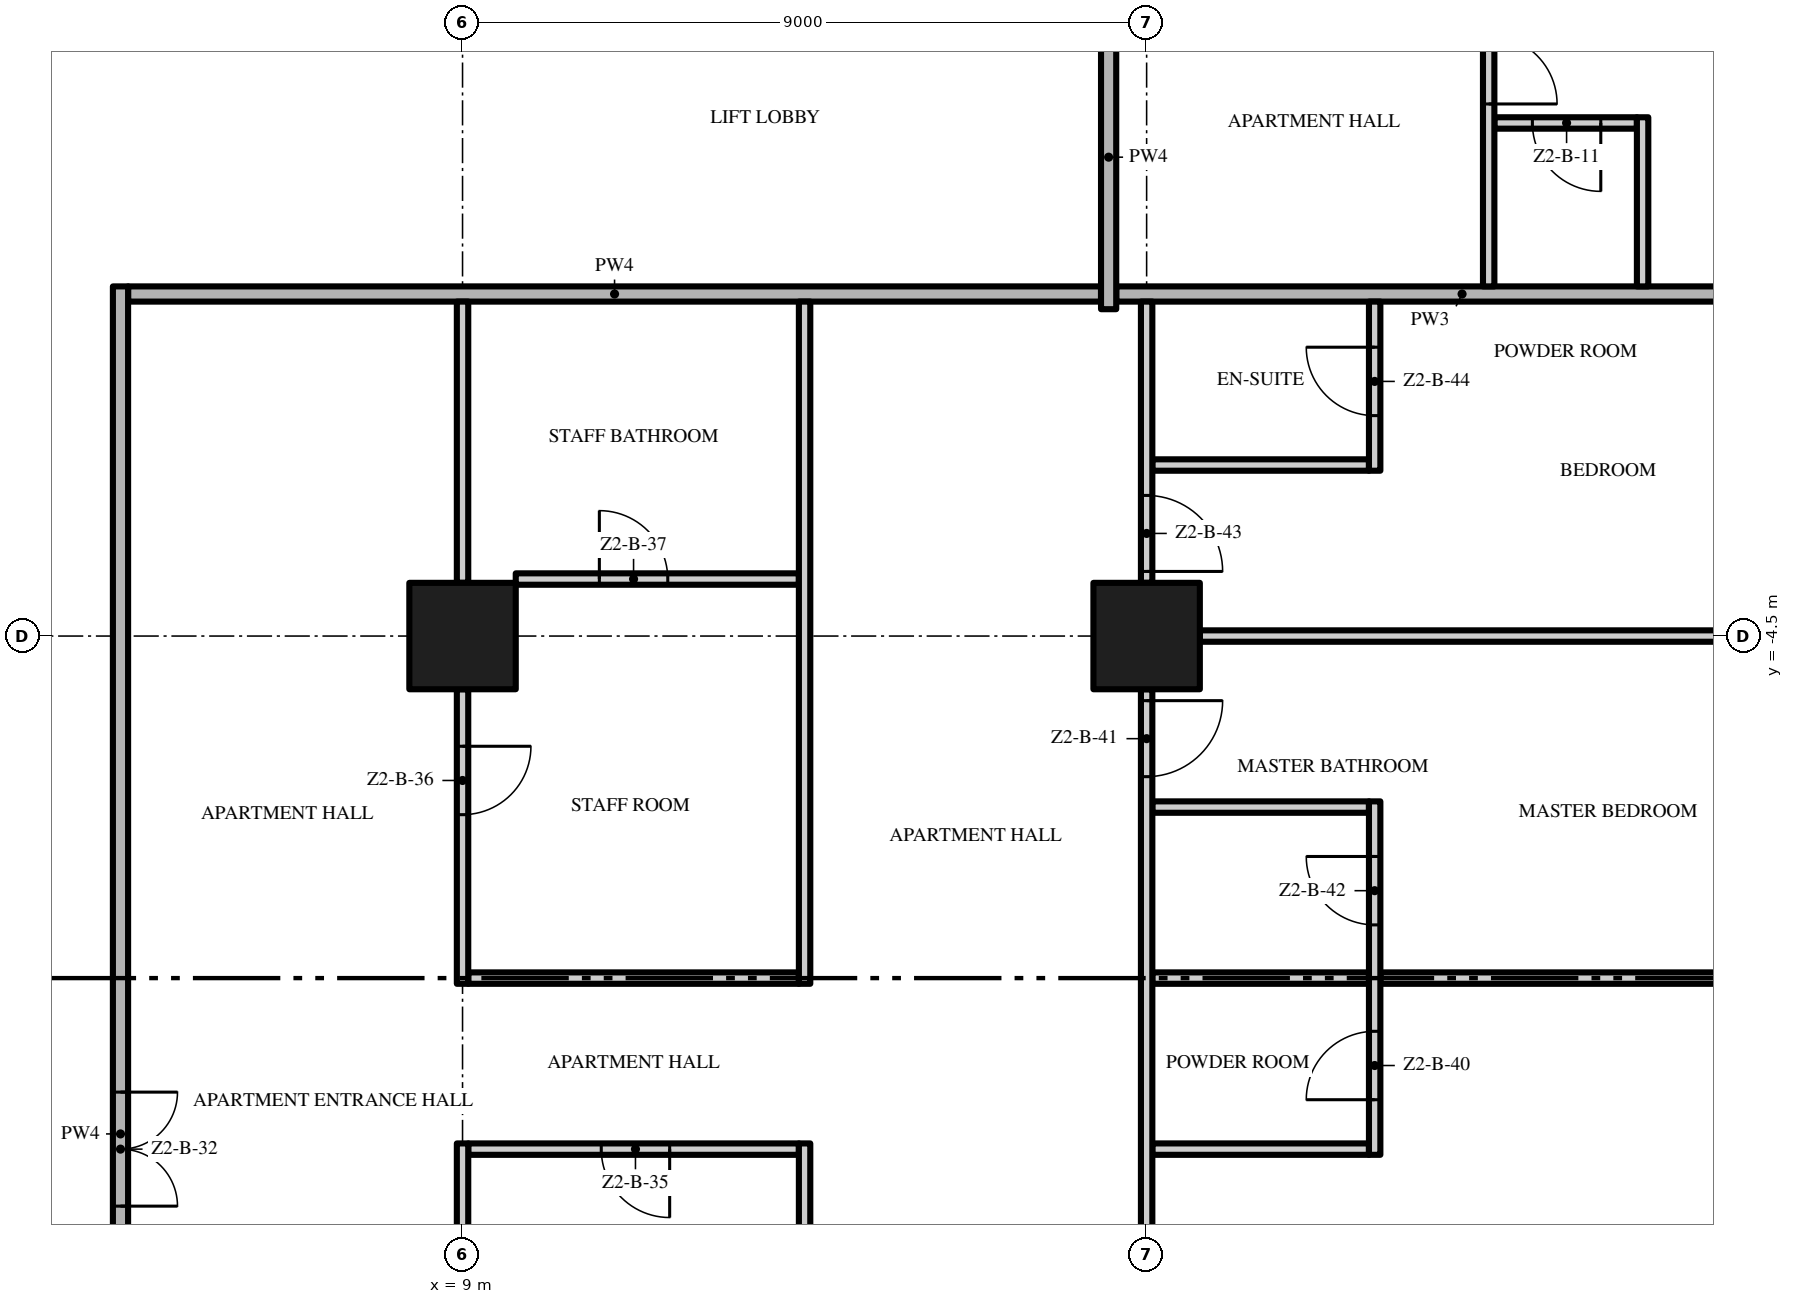
"""IFC4 building model, lengths in metres.
Left out: names, types, materials, properties, quantities, classifications, styles, units other than length and angle.
Written with IfcOpenShell. Run it as: python <this file> out.ifc"""

import sys

from ifc_helpers import new_model, si_unit, direction, frame, frame_2d, origin, origin_2d, place, context, subcontext, project, spatial, rectangle, extrude, element, fill, save


model = new_model("IFC4")
c1 = context("Model", 3, precision=1e-05, world=origin(), true_north=direction((0.0, 1.0)))
c2 = subcontext(c1, "Body", "Model", "MODEL_VIEW")
j1 = project(units=[si_unit("LENGTHUNIT", "METRE"), si_unit("PLANEANGLEUNIT", "RADIAN")], contexts=[c1])
p1 = place(None, origin())
s1 = spatial("IfcSite", under=j1, at=p1, CompositionType="ELEMENT")
p2 = place(p1, origin())
s2 = spatial("IfcBuilding", under=s1, at=p2, CompositionType="ELEMENT")
p3 = place(p2, frame((0.0, 0.0, 80.8)))
s3 = spatial("IfcBuildingStorey", under=s2, at=p3, CompositionType="ELEMENT", Elevation=80.8)
for number, where, z_axis, x_axis in (
    (1, (18.0, -4.5, 0.0), (0.0, 0.0, 1.0), (1.0, 0.0, 0.0)),
    (2, (9.0, -4.5, 0.0), (0.0, 0.0, 1.0), (1.0, 0.0, 0.0)),
):
    element("IfcColumn", number, at=place(p3, frame(where, z_axis=z_axis, x_axis=x_axis)), inside=s3, PredefinedType="COLUMN", context=c2, shape_type="SweptSolid", body=[
        extrude(rectangle(XDim=1.4, YDim=1.4, at=origin_2d()), origin(), (0.0, 0.0, 1.0), 3.5),
    ])
p4 = place(p3, frame((13.425, -11.25, 0.0), z_axis=(0.0, 0.0, 1.0), x_axis=(-1.0, 0.0, 0.0)))
e3 = element("IfcWall", 3, at=p4, inside=s3, PredefinedType="PARTITIONING", context=c2, shape_type="SweptSolid", body=[
    extrude(rectangle(XDim=4.35, YDim=0.15, at=frame_2d((2.175, 0.0))), origin(), (0.0, 0.0, 1.0), 3.5),
])
p5 = place(p4, frame((1.7, 0.0, 0.0)))
e4 = element("IfcOpeningElement", 4, at=p5, cuts=e3, PredefinedType="OPENING", context=c2, shape_type="SweptSolid", body=[
    extrude(rectangle(XDim=0.9, YDim=2.1, at=frame_2d((0.45, 1.05))), frame((0.0, 0.085, 0.0), z_axis=(0.0, -1.0, 0.0), x_axis=(1.0, 0.0, 0.0)), (0.0, 0.0, 1.0), 0.17),
])
p6 = place(p3, frame((18.075, -11.25, 0.0), z_axis=(0.0, 0.0, 1.0), x_axis=(1.0, 0.0, 0.0)))
e5 = element("IfcWall", 5, at=p6, inside=s3, PredefinedType="PARTITIONING", context=c2, shape_type="SweptSolid", body=[
    extrude(rectangle(XDim=2.85, YDim=0.15, at=frame_2d((1.425, 0.0))), origin(), (0.0, 0.0, 1.0), 3.5),
])
p7 = place(p3, frame((9.075, -9.0, 0.0), z_axis=(0.0, 0.0, 1.0), x_axis=(1.0, 0.0, 0.0)))
e6 = element("IfcWall", 6, at=p7, inside=s3, PredefinedType="PARTITIONING", context=c2, shape_type="SweptSolid", body=[
    extrude(rectangle(XDim=4.35, YDim=0.15, at=frame_2d((2.175, 0.0))), origin(), (0.0, 0.0, 1.0), 3.5),
])
p8 = place(p3, frame((18.075, -9.0, 0.0), z_axis=(0.0, 0.0, 1.0), x_axis=(1.0, 0.0, 0.0)))
e7 = element("IfcWall", 7, at=p8, inside=s3, PredefinedType="PARTITIONING", context=c2, shape_type="SweptSolid", body=[
    extrude(rectangle(XDim=2.85, YDim=0.15, at=frame_2d((1.425, 0.0))), origin(), (0.0, 0.0, 1.0), 3.5),
])
p9 = place(p3, frame((21.075, -9.0, 0.0), z_axis=(0.0, 0.0, 1.0), x_axis=(1.0, 0.0, 0.0)))
e8 = element("IfcWall", 8, at=p9, inside=s3, PredefinedType="PARTITIONING", context=c2, shape_type="SweptSolid", body=[
    extrude(rectangle(XDim=5.625, YDim=0.15, at=frame_2d((2.812, 0.0))), origin(), (0.0, 0.0, 1.0), 3.5),
])
p10 = place(p3, frame((18.075, -6.75, 0.0), z_axis=(0.0, 0.0, 1.0), x_axis=(1.0, 0.0, 0.0)))
e9 = element("IfcWall", 9, at=p10, inside=s3, PredefinedType="PARTITIONING", context=c2, shape_type="SweptSolid", body=[
    extrude(rectangle(XDim=2.85, YDim=0.15, at=frame_2d((1.425, 0.0))), origin(), (0.0, 0.0, 1.0), 3.5),
])
p11 = place(p3, frame((18.7, -4.5, 0.0), z_axis=(0.0, 0.0, 1.0), x_axis=(1.0, 0.0, 0.0)))
e10 = element("IfcWall", 10, at=p11, inside=s3, PredefinedType="PARTITIONING", context=c2, shape_type="SweptSolid", body=[
    extrude(rectangle(XDim=7.0, YDim=0.15, at=frame_2d((3.5, 0.0))), origin(), (0.0, 0.0, 1.0), 3.5),
])
p12 = place(p3, frame((9.7, -3.75, 0.0), z_axis=(0.0, 0.0, 1.0), x_axis=(1.0, 0.0, 0.0)))
e11 = element("IfcWall", 11, at=p12, inside=s3, PredefinedType="PARTITIONING", context=c2, shape_type="SweptSolid", body=[
    extrude(rectangle(XDim=3.725, YDim=0.15, at=frame_2d((1.863, 0.0))), origin(), (0.0, 0.0, 1.0), 3.5),
])
p13 = place(p12, frame((1.1, 0.0, 0.0)))
e12 = element("IfcOpeningElement", 12, at=p13, cuts=e11, PredefinedType="OPENING", context=c2, shape_type="SweptSolid", body=[
    extrude(rectangle(XDim=0.9, YDim=2.1, at=frame_2d((0.45, 1.05))), frame((0.0, 0.085, 0.0), z_axis=(0.0, -1.0, 0.0), x_axis=(1.0, 0.0, 0.0)), (0.0, 0.0, 1.0), 0.17),
])
p14 = place(p3, frame((18.075, -2.25, 0.0), z_axis=(0.0, 0.0, 1.0), x_axis=(1.0, 0.0, 0.0)))
e13 = element("IfcWall", 13, at=p14, inside=s3, PredefinedType="PARTITIONING", context=c2, shape_type="SweptSolid", body=[
    extrude(rectangle(XDim=2.85, YDim=0.15, at=frame_2d((1.425, 0.0))), origin(), (0.0, 0.0, 1.0), 3.5),
])
p15 = place(p3, frame((4.6, 0.0, 0.0), z_axis=(0.0, 0.0, 1.0), x_axis=(1.0, 0.0, 0.0)))
e14 = element("IfcWall", 14, at=p15, inside=s3, PredefinedType="PARTITIONING", context=c2, shape_type="SweptSolid", body=[
    extrude(rectangle(XDim=12.8, YDim=0.2, at=frame_2d((6.4, 0.0))), origin(), (0.0, 0.0, 1.0), 3.5),
])
p16 = place(p3, frame((17.6, 0.0, 0.0), z_axis=(0.0, 0.0, 1.0), x_axis=(1.0, 0.0, 0.0)))
e15 = element("IfcWall", 15, at=p16, inside=s3, PredefinedType="PARTITIONING", context=c2, shape_type="SweptSolid", body=[
    extrude(rectangle(XDim=9.1, YDim=0.2, at=frame_2d((4.55, 0.0))), origin(), (0.0, 0.0, 1.0), 3.5),
])
p17 = place(p3, frame((24.45, 2.25, 0.0), z_axis=(0.0, 0.0, 1.0), x_axis=(-1.0, 0.0, 0.0)))
e16 = element("IfcWall", 16, at=p17, inside=s3, PredefinedType="PARTITIONING", context=c2, shape_type="SweptSolid", body=[
    extrude(rectangle(XDim=1.875, YDim=0.15, at=frame_2d((0.938, 0.0))), origin(), (0.0, 0.0, 1.0), 3.5),
])
p18 = place(p17, frame((0.475, 0.0, 0.0)))
e17 = element("IfcOpeningElement", 17, at=p18, cuts=e16, PredefinedType="OPENING", context=c2, shape_type="SweptSolid", body=[
    extrude(rectangle(XDim=0.9, YDim=2.1, at=frame_2d((0.45, 1.05))), frame((0.0, 0.085, 0.0), z_axis=(0.0, -1.0, 0.0), x_axis=(1.0, 0.0, 0.0)), (0.0, 0.0, 1.0), 0.17),
])
p19 = place(p3, frame((4.5, 0.1, 0.0), z_axis=(0.0, 0.0, 1.0), x_axis=(0.0, -1.0, 0.0)))
e18 = element("IfcWall", 18, at=p19, inside=s3, PredefinedType="PARTITIONING", context=c2, shape_type="SweptSolid", body=[
    extrude(rectangle(XDim=22.3, YDim=0.2, at=frame_2d((11.15, 0.0))), origin(), (0.0, 0.0, 1.0), 3.5),
])
p20 = place(p19, frame((10.6, 0.0, 0.0)))
e19 = element("IfcOpeningElement", 19, at=p20, cuts=e18, PredefinedType="OPENING", context=c2, shape_type="SweptSolid", body=[
    extrude(rectangle(XDim=1.5, YDim=2.4, at=frame_2d((0.75, 1.2))), frame((0.0, 0.11, 0.0), z_axis=(0.0, -1.0, 0.0), x_axis=(1.0, 0.0, 0.0)), (0.0, 0.0, 1.0), 0.22),
])
p21 = place(p3, frame((9.0, -12.8, 0.0), z_axis=(0.0, 0.0, 1.0), x_axis=(0.0, 1.0, 0.0)))
e20 = element("IfcWall", 20, at=p21, inside=s3, PredefinedType="PARTITIONING", context=c2, shape_type="SweptSolid", body=[
    extrude(rectangle(XDim=1.625, YDim=0.15, at=frame_2d((0.812, 0.0))), origin(), (0.0, 0.0, 1.0), 3.5),
])
p22 = place(p3, frame((9.0, -5.2, 0.0), z_axis=(0.0, 0.0, 1.0), x_axis=(0.0, -1.0, 0.0)))
e21 = element("IfcWall", 21, at=p22, inside=s3, PredefinedType="PARTITIONING", context=c2, shape_type="SweptSolid", body=[
    extrude(rectangle(XDim=3.875, YDim=0.15, at=frame_2d((1.938, 0.0))), origin(), (0.0, 0.0, 1.0), 3.5),
])
p23 = place(p22, frame((0.75, 0.0, 0.0)))
e22 = element("IfcOpeningElement", 22, at=p23, cuts=e21, PredefinedType="OPENING", context=c2, shape_type="SweptSolid", body=[
    extrude(rectangle(XDim=0.9, YDim=2.1, at=frame_2d((0.45, 1.05))), frame((0.0, 0.085, 0.0), z_axis=(0.0, -1.0, 0.0), x_axis=(1.0, 0.0, 0.0)), (0.0, 0.0, 1.0), 0.17),
])
p24 = place(p3, frame((9.0, -3.8, 0.0), z_axis=(0.0, 0.0, 1.0), x_axis=(0.0, 1.0, 0.0)))
e23 = element("IfcWall", 23, at=p24, inside=s3, PredefinedType="PARTITIONING", context=c2, shape_type="SweptSolid", body=[
    extrude(rectangle(XDim=3.7, YDim=0.15, at=frame_2d((1.85, 0.0))), origin(), (0.0, 0.0, 1.0), 3.5),
])
p25 = place(p3, frame((13.5, -22.2, 0.0), z_axis=(0.0, 0.0, 1.0), x_axis=(0.0, 1.0, 0.0)))
e24 = element("IfcWall", 24, at=p25, inside=s3, PredefinedType="PARTITIONING", context=c2, shape_type="SweptSolid", body=[
    extrude(rectangle(XDim=11.025, YDim=0.15, at=frame_2d((5.513, 0.0))), origin(), (0.0, 0.0, 1.0), 3.5),
])
p26 = place(p3, frame((13.5, -9.075, 0.0), z_axis=(0.0, 0.0, 1.0), x_axis=(0.0, 1.0, 0.0)))
e25 = element("IfcWall", 25, at=p26, inside=s3, PredefinedType="PARTITIONING", context=c2, shape_type="SweptSolid", body=[
    extrude(rectangle(XDim=8.975, YDim=0.15, at=frame_2d((4.487, 0.0))), origin(), (0.0, 0.0, 1.0), 3.5),
])
p27 = place(p3, frame((17.5, -0.2, 0.0), z_axis=(0.0, 0.0, 1.0), x_axis=(0.0, 1.0, 0.0)))
e26 = element("IfcWall", 26, at=p27, inside=s3, PredefinedType="PARTITIONING", context=c2, shape_type="SweptSolid", body=[
    extrude(rectangle(XDim=4.0, YDim=0.2, at=frame_2d((2.0, 0.0))), origin(), (0.0, 0.0, 1.0), 3.5),
])
p28 = place(p3, frame((18.0, -5.2, 0.0), z_axis=(0.0, 0.0, 1.0), x_axis=(0.0, -1.0, 0.0)))
e27 = element("IfcWall", 27, at=p28, inside=s3, PredefinedType="PARTITIONING", context=c2, shape_type="SweptSolid", body=[
    extrude(rectangle(XDim=7.6, YDim=0.15, at=frame_2d((3.8, 0.0))), origin(), (0.0, 0.0, 1.0), 3.5),
])
p29 = place(p28, frame((0.15, 0.0, 0.0)))
e28 = element("IfcOpeningElement", 28, at=p29, cuts=e27, PredefinedType="OPENING", context=c2, shape_type="SweptSolid", body=[
    extrude(rectangle(XDim=1.0, YDim=2.4, at=frame_2d((0.5, 1.2))), frame((0.0, 0.085, 0.0), z_axis=(0.0, -1.0, 0.0), x_axis=(1.0, 0.0, 0.0)), (0.0, 0.0, 1.0), 0.17),
])
p30 = place(p3, frame((18.0, -0.1, 0.0), z_axis=(0.0, 0.0, 1.0), x_axis=(0.0, -1.0, 0.0)))
e29 = element("IfcWall", 29, at=p30, inside=s3, PredefinedType="PARTITIONING", context=c2, shape_type="SweptSolid", body=[
    extrude(rectangle(XDim=3.7, YDim=0.15, at=frame_2d((1.85, 0.0))), origin(), (0.0, 0.0, 1.0), 3.5),
])
p31 = place(p30, frame((2.55, 0.0, 0.0)))
e30 = element("IfcOpeningElement", 30, at=p31, cuts=e29, PredefinedType="OPENING", context=c2, shape_type="SweptSolid", body=[
    extrude(rectangle(XDim=1.0, YDim=2.4, at=frame_2d((0.5, 1.2))), frame((0.0, 0.085, 0.0), z_axis=(0.0, -1.0, 0.0), x_axis=(1.0, 0.0, 0.0)), (0.0, 0.0, 1.0), 0.17),
])
p32 = place(p3, frame((21.0, -11.325, 0.0), z_axis=(0.0, 0.0, 1.0), x_axis=(0.0, 1.0, 0.0)))
e31 = element("IfcWall", 31, at=p32, inside=s3, PredefinedType="PARTITIONING", context=c2, shape_type="SweptSolid", body=[
    extrude(rectangle(XDim=4.65, YDim=0.15, at=frame_2d((2.325, 0.0))), origin(), (0.0, 0.0, 1.0), 3.5),
])
p33 = place(p32, frame((0.725, 0.0, 0.0)))
e32 = element("IfcOpeningElement", 32, at=p33, cuts=e31, PredefinedType="OPENING", context=c2, shape_type="SweptSolid", body=[
    extrude(rectangle(XDim=0.9, YDim=2.1, at=frame_2d((0.45, 1.05))), frame((0.0, 0.085, 0.0), z_axis=(0.0, -1.0, 0.0), x_axis=(1.0, 0.0, 0.0)), (0.0, 0.0, 1.0), 0.17),
])
p34 = place(p32, frame((3.025, 0.0, 0.0)))
e33 = element("IfcOpeningElement", 33, at=p34, cuts=e31, PredefinedType="OPENING", context=c2, shape_type="SweptSolid", body=[
    extrude(rectangle(XDim=0.9, YDim=2.1, at=frame_2d((0.45, 1.05))), frame((0.0, 0.085, 0.0), z_axis=(0.0, -1.0, 0.0), x_axis=(1.0, 0.0, 0.0)), (0.0, 0.0, 1.0), 0.17),
])
p35 = place(p3, frame((21.0, -2.325, 0.0), z_axis=(0.0, 0.0, 1.0), x_axis=(0.0, 1.0, 0.0)))
e34 = element("IfcWall", 34, at=p35, inside=s3, PredefinedType="PARTITIONING", context=c2, shape_type="SweptSolid", body=[
    extrude(rectangle(XDim=2.225, YDim=0.15, at=frame_2d((1.113, 0.0))), origin(), (0.0, 0.0, 1.0), 3.5),
])
p36 = place(p35, frame((0.725, 0.0, 0.0)))
e35 = element("IfcOpeningElement", 35, at=p36, cuts=e34, PredefinedType="OPENING", context=c2, shape_type="SweptSolid", body=[
    extrude(rectangle(XDim=0.9, YDim=2.1, at=frame_2d((0.45, 1.05))), frame((0.0, 0.085, 0.0), z_axis=(0.0, -1.0, 0.0), x_axis=(1.0, 0.0, 0.0)), (0.0, 0.0, 1.0), 0.17),
])
p37 = place(p3, frame((22.5, 17.35, 0.0), z_axis=(0.0, 0.0, 1.0), x_axis=(0.0, -1.0, 0.0)))
e36 = element("IfcWall", 36, at=p37, inside=s3, PredefinedType="PARTITIONING", context=c2, shape_type="SweptSolid", body=[
    extrude(rectangle(XDim=17.25, YDim=0.15, at=frame_2d((8.625, 0.0))), origin(), (0.0, 0.0, 1.0), 3.5),
])
p38 = place(p37, frame((13.05, 0.0, 0.0)))
e37 = element("IfcOpeningElement", 37, at=p38, cuts=e36, PredefinedType="OPENING", context=c2, shape_type="SweptSolid", body=[
    extrude(rectangle(XDim=1.8, YDim=2.4, at=frame_2d((0.9, 1.2))), frame((0.0, 0.085, 0.0), z_axis=(0.0, -1.0, 0.0), x_axis=(1.0, 0.0, 0.0)), (0.0, 0.0, 1.0), 0.17),
])
p39 = place(p37, frame((5.6, 0.0, 0.0)))
e38 = element("IfcOpeningElement", 38, at=p39, cuts=e36, PredefinedType="OPENING", context=c2, shape_type="SweptSolid", body=[
    extrude(rectangle(XDim=1.0, YDim=2.4, at=frame_2d((0.5, 1.2))), frame((0.0, 0.085, 0.0), z_axis=(0.0, -1.0, 0.0), x_axis=(1.0, 0.0, 0.0)), (0.0, 0.0, 1.0), 0.17),
])
p40 = place(p3, frame((24.525, 0.1, 0.0), z_axis=(0.0, 0.0, 1.0), x_axis=(0.0, 1.0, 0.0)))
e39 = element("IfcWall", 39, at=p40, inside=s3, PredefinedType="PARTITIONING", context=c2, shape_type="SweptSolid", body=[
    extrude(rectangle(XDim=2.225, YDim=0.15, at=frame_2d((1.113, 0.0))), origin(), (0.0, 0.0, 1.0), 3.5),
])
p41 = place(p38, origin())
e40 = element("IfcDoor", 40, at=p41, inside=s3, OperationType="DOUBLE_DOOR_SINGLE_SWING", PredefinedType="DOOR", context=c2, shape_type="SweptSolid", body=[
    extrude(rectangle(XDim=1.8, YDim=2.4, at=frame_2d((0.9, 1.2))), frame((0.0, 0.025, 0.0), z_axis=(0.0, -1.0, 0.0), x_axis=(1.0, 0.0, 0.0)), (0.0, 0.0, 1.0), 0.05),
])
fill(e37, e40)
p42 = place(p18, origin())
e41 = element("IfcDoor", 41, at=p42, inside=s3, OperationType="SINGLE_SWING_LEFT", PredefinedType="DOOR", context=c2, shape_type="SweptSolid", body=[
    extrude(rectangle(XDim=0.9, YDim=2.1, at=frame_2d((0.45, 1.05))), frame((0.0, 0.025, 0.0), z_axis=(0.0, -1.0, 0.0), x_axis=(1.0, 0.0, 0.0)), (0.0, 0.0, 1.0), 0.05),
])
fill(e17, e41)
p43 = place(p20, origin())
e42 = element("IfcDoor", 42, at=p43, inside=s3, OperationType="DOUBLE_DOOR_SINGLE_SWING", PredefinedType="DOOR", context=c2, shape_type="SweptSolid", body=[
    extrude(rectangle(XDim=1.5, YDim=2.4, at=frame_2d((0.75, 1.2))), frame((0.0, 0.025, 0.0), z_axis=(0.0, -1.0, 0.0), x_axis=(1.0, 0.0, 0.0)), (0.0, 0.0, 1.0), 0.05),
])
fill(e19, e42)
p44 = place(p5, origin())
e43 = element("IfcDoor", 43, at=p44, inside=s3, OperationType="SINGLE_SWING_LEFT", PredefinedType="DOOR", context=c2, shape_type="SweptSolid", body=[
    extrude(rectangle(XDim=0.9, YDim=2.1, at=frame_2d((0.45, 1.05))), frame((0.0, 0.025, 0.0), z_axis=(0.0, -1.0, 0.0), x_axis=(1.0, 0.0, 0.0)), (0.0, 0.0, 1.0), 0.05),
])
fill(e4, e43)
p45 = place(p23, origin())
e44 = element("IfcDoor", 44, at=p45, inside=s3, OperationType="SINGLE_SWING_LEFT", PredefinedType="DOOR", context=c2, shape_type="SweptSolid", body=[
    extrude(rectangle(XDim=0.9, YDim=2.1, at=frame_2d((0.45, 1.05))), frame((0.0, 0.025, 0.0), z_axis=(0.0, -1.0, 0.0), x_axis=(1.0, 0.0, 0.0)), (0.0, 0.0, 1.0), 0.05),
])
fill(e22, e44)
p46 = place(p13, origin())
e45 = element("IfcDoor", 45, at=p46, inside=s3, OperationType="SINGLE_SWING_LEFT", PredefinedType="DOOR", context=c2, shape_type="SweptSolid", body=[
    extrude(rectangle(XDim=0.9, YDim=2.1, at=frame_2d((0.45, 1.05))), frame((0.0, 0.025, 0.0), z_axis=(0.0, -1.0, 0.0), x_axis=(1.0, 0.0, 0.0)), (0.0, 0.0, 1.0), 0.05),
])
fill(e12, e45)
p47 = place(p33, origin())
e46 = element("IfcDoor", 46, at=p47, inside=s3, OperationType="SINGLE_SWING_LEFT", PredefinedType="DOOR", context=c2, shape_type="SweptSolid", body=[
    extrude(rectangle(XDim=0.9, YDim=2.1, at=frame_2d((0.45, 1.05))), frame((0.0, 0.025, 0.0), z_axis=(0.0, -1.0, 0.0), x_axis=(1.0, 0.0, 0.0)), (0.0, 0.0, 1.0), 0.05),
])
fill(e32, e46)
p48 = place(p29, origin())
e47 = element("IfcDoor", 47, at=p48, inside=s3, OperationType="SINGLE_SWING_LEFT", PredefinedType="DOOR", context=c2, shape_type="SweptSolid", body=[
    extrude(rectangle(XDim=1.0, YDim=2.4, at=frame_2d((0.5, 1.2))), frame((0.0, 0.025, 0.0), z_axis=(0.0, -1.0, 0.0), x_axis=(1.0, 0.0, 0.0)), (0.0, 0.0, 1.0), 0.05),
])
fill(e28, e47)
p49 = place(p34, origin())
e48 = element("IfcDoor", 48, at=p49, inside=s3, OperationType="SINGLE_SWING_RIGHT", PredefinedType="DOOR", context=c2, shape_type="SweptSolid", body=[
    extrude(rectangle(XDim=0.9, YDim=2.1, at=frame_2d((0.45, 1.05))), frame((0.0, 0.025, 0.0), z_axis=(0.0, -1.0, 0.0), x_axis=(1.0, 0.0, 0.0)), (0.0, 0.0, 1.0), 0.05),
])
fill(e33, e48)
p50 = place(p31, origin())
e49 = element("IfcDoor", 49, at=p50, inside=s3, OperationType="SINGLE_SWING_RIGHT", PredefinedType="DOOR", context=c2, shape_type="SweptSolid", body=[
    extrude(rectangle(XDim=1.0, YDim=2.4, at=frame_2d((0.5, 1.2))), frame((0.0, 0.025, 0.0), z_axis=(0.0, -1.0, 0.0), x_axis=(1.0, 0.0, 0.0)), (0.0, 0.0, 1.0), 0.05),
])
fill(e30, e49)
p51 = place(p36, origin())
e50 = element("IfcDoor", 50, at=p51, inside=s3, OperationType="SINGLE_SWING_RIGHT", PredefinedType="DOOR", context=c2, shape_type="SweptSolid", body=[
    extrude(rectangle(XDim=0.9, YDim=2.1, at=frame_2d((0.45, 1.05))), frame((0.0, 0.025, 0.0), z_axis=(0.0, -1.0, 0.0), x_axis=(1.0, 0.0, 0.0)), (0.0, 0.0, 1.0), 0.05),
])
fill(e35, e50)
save(model, sys.argv[1])
